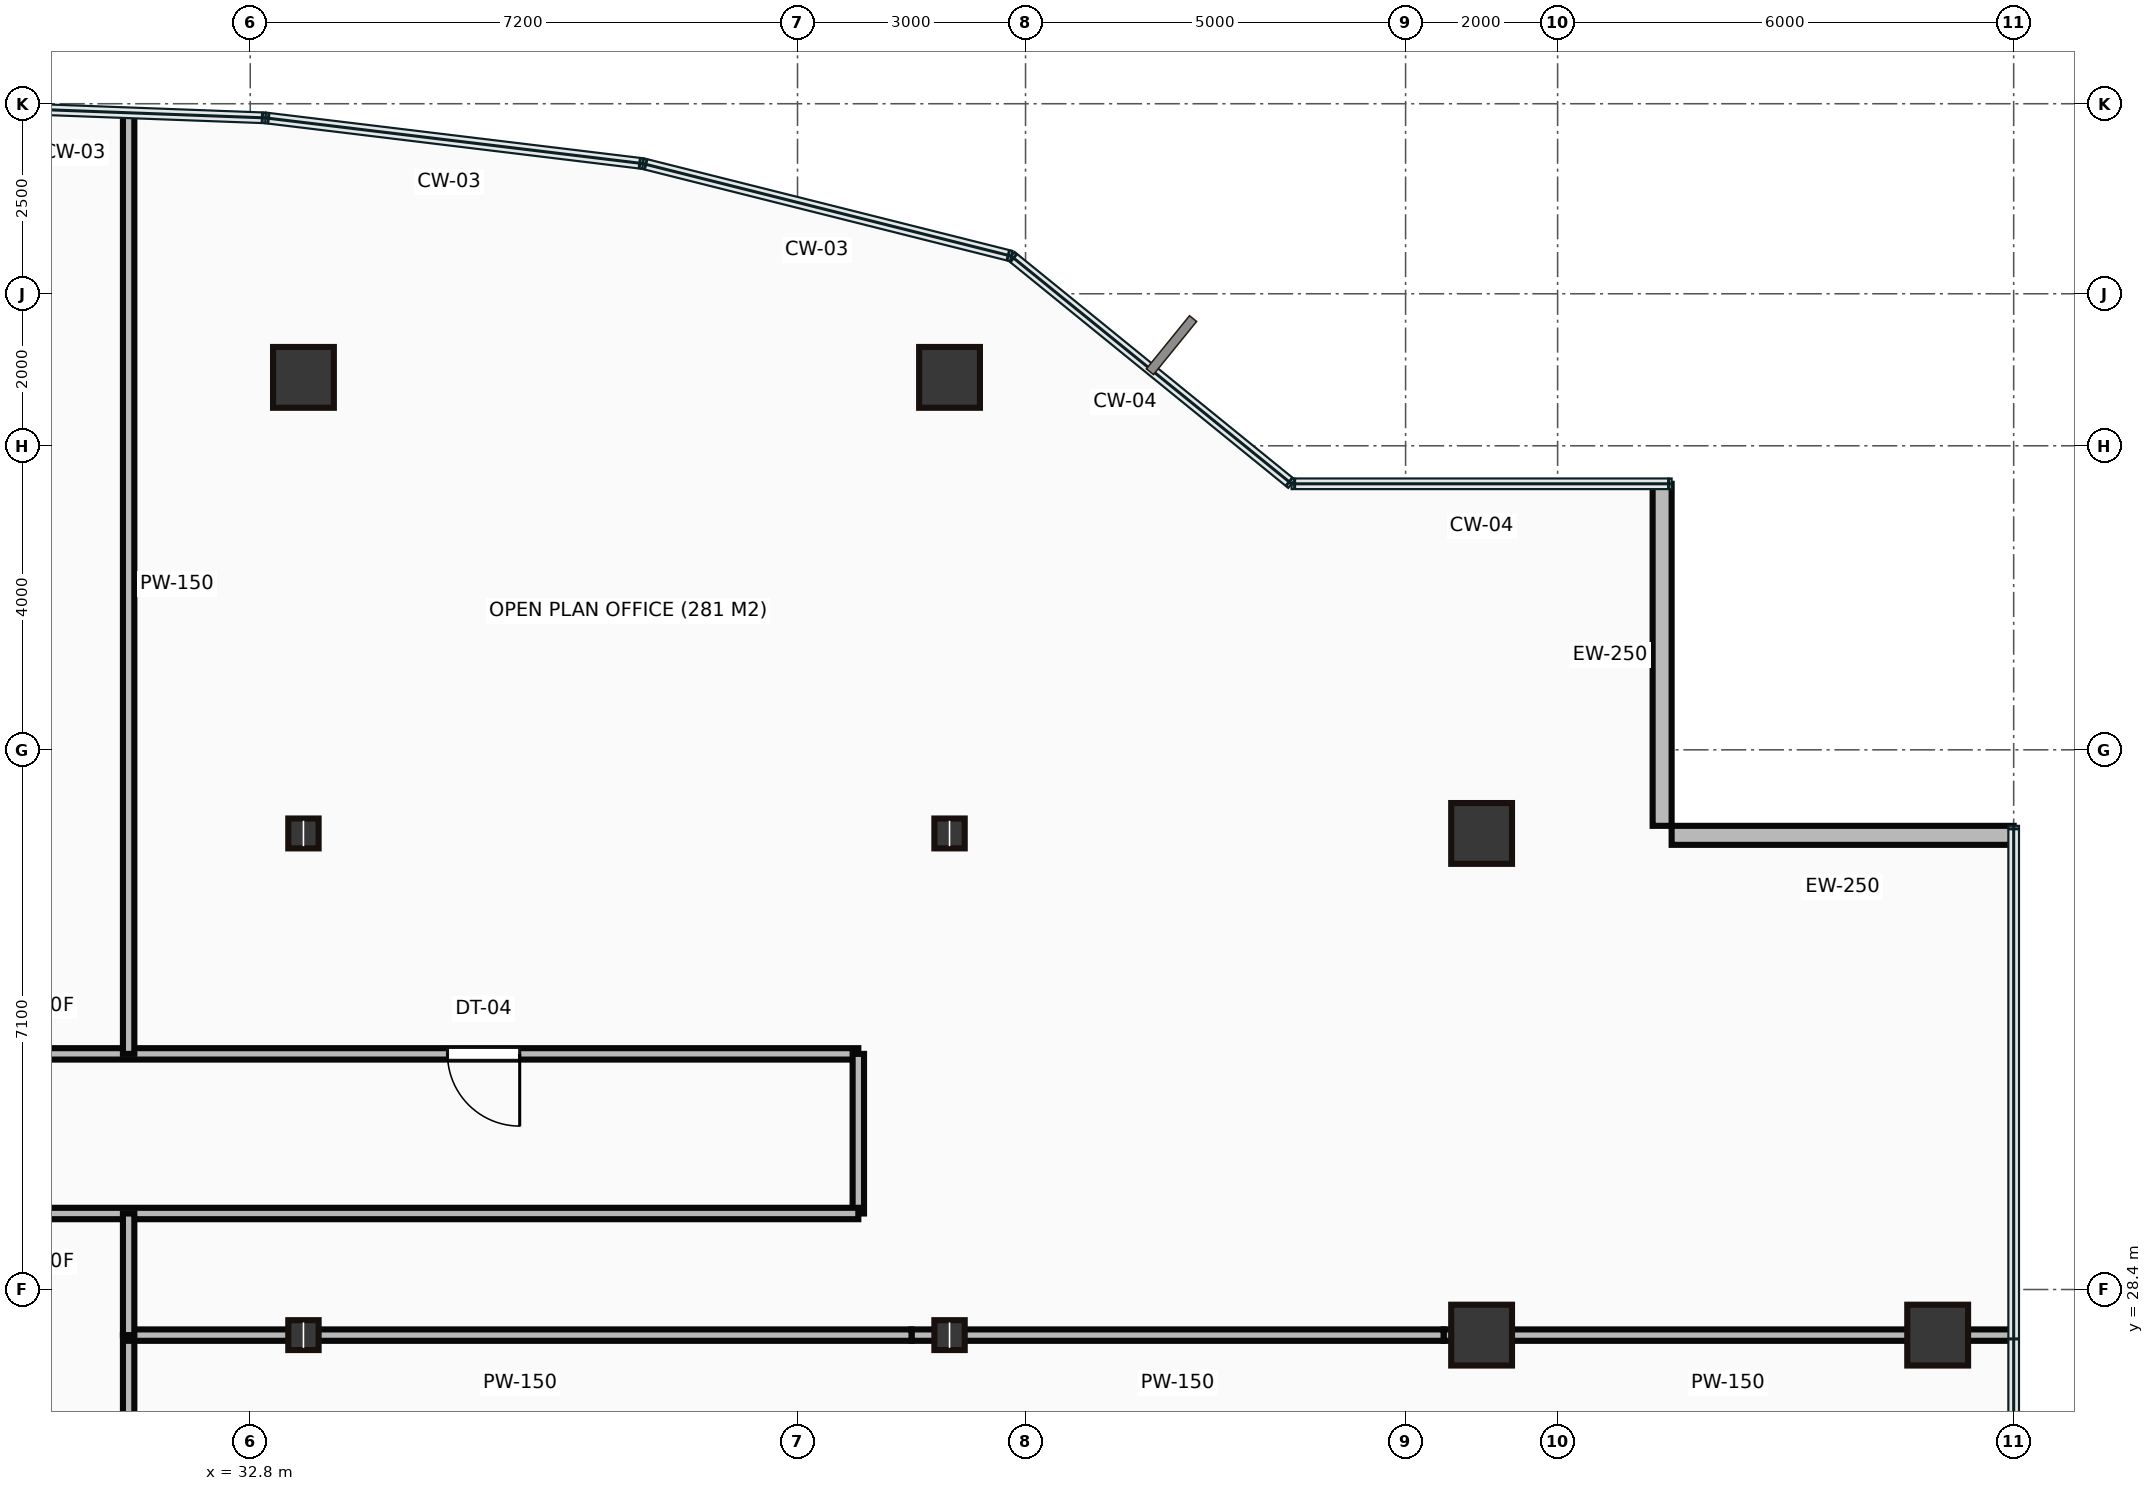
"""IFC4 building model, lengths in metres.
Left out: names, types, materials, properties, quantities, classifications, styles, units other than length and angle.
Written with IfcOpenShell. Run it as: python <this file> out.ifc"""

import sys

from ifc_helpers import new_model, si_unit, direction, frame, frame_2d, origin, origin_2d, place, context, subcontext, project, spatial, rectangle, hollow_rectangle, i_section, extrude, source, transform, mapped, element, fill, save


model = new_model("IFC4")
c1 = context("Model", 3, precision=1e-05, world=origin(), true_north=direction((0.0, 1.0)))
c2 = subcontext(c1, "Body", "Model", "MODEL_VIEW")
j1 = project(units=[si_unit("LENGTHUNIT", "METRE"), si_unit("PLANEANGLEUNIT", "RADIAN")], contexts=[c1])
p1 = place(None, origin())
s1 = spatial("IfcSite", under=j1, at=p1, CompositionType="ELEMENT")
p2 = place(p1, origin())
s2 = spatial("IfcBuilding", under=s1, at=p2, CompositionType="ELEMENT")
p3 = place(p2, frame((0.0, 0.0, 110.55)))
s3 = spatial("IfcBuildingStorey", under=s2, at=p3, CompositionType="ELEMENT", Elevation=110.55)
m1 = source(origin(), c2, "Body", "SweptSolid", [
    extrude(i_section(OverallWidth=0.399, OverallDepth=0.393, WebThickness=0.023, FlangeThickness=0.037, at=origin_2d()), origin(), (0.0, 0.0, 1.0), 3.65),
])
for number, where, z_axis, x_axis in (
    (1, (33.5, 27.8, 0.0), (0.0, 0.0, 1.0), (1.0, 0.0, 0.0)),
    (2, (33.5, 34.4, 0.0), (0.0, 0.0, 1.0), (1.0, 0.0, 0.0)),
):
    element("IfcColumn", number, at=place(p3, frame(where, z_axis=z_axis, x_axis=x_axis)), inside=s3, PredefinedType="COLUMN", context=c2, shape_type="MappedRepresentation", body=[
        mapped(m1, transform((0.0, 0.0, 0.0))),
    ])
m2 = source(origin(), c2, "Body", "SweptSolid", [
    extrude(hollow_rectangle(XDim=0.8, YDim=0.8, WallThickness=0.04, at=origin_2d()), origin(), (0.0, 0.0, 1.0), 3.65),
])
p4 = place(p3, frame((33.5, 40.4, 0.0), z_axis=(0.0, 0.0, 1.0), x_axis=(1.0, 0.0, 0.0)))
e3 = element("IfcColumn", 3, at=p4, inside=s3, PredefinedType="COLUMN", context=c2, shape_type="MappedRepresentation", body=[
    mapped(m2, transform((0.0, 0.0, 0.0))),
])
for number, where, z_axis, x_axis in (
    (4, (42.0, 27.8, 0.0), (0.0, 0.0, 1.0), (1.0, 0.0, 0.0)),
    (5, (42.0, 34.4, 0.0), (0.0, 0.0, 1.0), (1.0, 0.0, 0.0)),
):
    element("IfcColumn", number, at=place(p3, frame(where, z_axis=z_axis, x_axis=x_axis)), inside=s3, PredefinedType="COLUMN", context=c2, shape_type="MappedRepresentation", body=[
        mapped(m1, transform((0.0, 0.0, 0.0))),
    ])
for number, where, z_axis, x_axis in (
    (6, (42.0, 40.4, 0.0), (0.0, 0.0, 1.0), (1.0, 0.0, 0.0)),
    (7, (49.0, 27.8, 0.0), (0.0, 0.0, 1.0), (1.0, 0.0, 0.0)),
    (8, (49.0, 34.4, 0.0), (0.0, 0.0, 1.0), (1.0, 0.0, 0.0)),
    (9, (55.0, 27.8, 0.0), (0.0, 0.0, 1.0), (1.0, 0.0, 0.0)),
):
    element("IfcColumn", number, at=place(p3, frame(where, z_axis=z_axis, x_axis=x_axis)), inside=s3, PredefinedType="COLUMN", context=c2, shape_type="MappedRepresentation", body=[
        mapped(m2, transform((0.0, 0.0, 0.0))),
    ])
m3 = source(origin(), c2, "Body", "SweptSolid", [
    extrude(rectangle(XDim=4.5, YDim=0.25, at=frame_2d((2.25, 0.0))), origin(), (0.0, 0.0, 1.0), 3.4),
])
for number, where, z_axis, x_axis in (
    (10, (56.0, 34.375, 0.0), (0.0, 0.0, 1.0), (-1.0, 0.0, 0.0)),
    (11, (51.375, 34.5, 0.0), (0.0, 0.0, 1.0), (0.0, 1.0, 0.0)),
):
    element("IfcWall", number, at=place(p3, frame(where, z_axis=z_axis, x_axis=x_axis)), inside=s3, PredefinedType="STANDARD", context=c2, shape_type="MappedRepresentation", body=[
        mapped(m3, transform((0.0, 0.0, 0.0))),
    ])
m4 = source(origin(), c2, "Body", "SweptSolid", [
    extrude(rectangle(XDim=21.75, YDim=0.15, at=frame_2d((10.875, 0.0))), origin(), (0.0, 0.0, 1.0), 3.4),
])
p5 = place(p3, frame((19.05, 31.5, 0.0), z_axis=(0.0, 0.0, 1.0), x_axis=(1.0, 0.0, 0.0)))
e12 = element("IfcWall", 12, at=p5, inside=s3, PredefinedType="PARTITIONING", context=c2, shape_type="MappedRepresentation", body=[
    mapped(m4, transform((0.0, 0.0, 0.0))),
])
p6 = place(p5, frame((1.03, 0.0, 0.0)))
e13 = element("IfcOpeningElement", 13, at=p6, cuts=e12, PredefinedType="OPENING", context=c2, shape_type="SweptSolid", body=[
    extrude(rectangle(XDim=0.95, YDim=2.15, at=frame_2d((0.475, 1.075))), frame((0.0, 0.085, 0.0), z_axis=(0.0, -1.0, 0.0), x_axis=(1.0, 0.0, 0.0)), (0.0, 0.0, 1.0), 0.17),
])
p7 = place(p5, frame((6.975, 0.0, 0.0)))
e14 = element("IfcOpeningElement", 14, at=p7, cuts=e12, PredefinedType="OPENING", context=c2, shape_type="SweptSolid", body=[
    extrude(rectangle(XDim=0.95, YDim=2.15, at=frame_2d((0.475, 1.075))), frame((0.0, 0.085, 0.0), z_axis=(0.0, -1.0, 0.0), x_axis=(1.0, 0.0, 0.0)), (0.0, 0.0, 1.0), 0.17),
])
p8 = place(p5, frame((16.345, 0.0, 0.0)))
e15 = element("IfcOpeningElement", 15, at=p8, cuts=e12, PredefinedType="OPENING", context=c2, shape_type="SweptSolid", body=[
    extrude(rectangle(XDim=0.95, YDim=2.15, at=frame_2d((0.475, 1.075))), frame((0.0, 0.085, 0.0), z_axis=(0.0, -1.0, 0.0), x_axis=(1.0, 0.0, 0.0)), (0.0, 0.0, 1.0), 0.17),
])
m5 = source(origin(), c2, "Body", "SweptSolid", [
    extrude(rectangle(XDim=2.1, YDim=0.15, at=frame_2d((1.05, 0.0))), origin(), (0.0, 0.0, 1.0), 3.4),
])
p9 = place(p3, frame((40.8, 31.5, 0.0), z_axis=(0.0, 0.0, 1.0), x_axis=(0.0, -1.0, 0.0)))
e16 = element("IfcWall", 16, at=p9, inside=s3, PredefinedType="PARTITIONING", context=c2, shape_type="MappedRepresentation", body=[
    mapped(m5, transform((0.0, 0.0, 0.0))),
])
p10 = place(p3, frame((40.8, 29.4, 0.0), z_axis=(0.0, 0.0, 1.0), x_axis=(-1.0, 0.0, 0.0)))
e17 = element("IfcWall", 17, at=p10, inside=s3, PredefinedType="PARTITIONING", context=c2, shape_type="MappedRepresentation", body=[
    mapped(m4, transform((0.0, 0.0, 0.0))),
])
m6 = source(origin(), c2, "Body", "SweptSolid", [
    extrude(rectangle(XDim=11.5, YDim=0.15, at=frame_2d((5.75, 0.0))), origin(), (0.0, 0.0, 1.0), 3.4),
])
p11 = place(p3, frame((31.2, 27.8, 0.0), z_axis=(0.0, 0.0, 1.0), x_axis=(0.0, -1.0, 0.0)))
e18 = element("IfcWall", 18, at=p11, inside=s3, PredefinedType="PARTITIONING", context=c2, shape_type="MappedRepresentation", body=[
    mapped(m6, transform((0.0, 0.0, 0.0))),
])
m7 = source(origin(), c2, "Body", "SweptSolid", [
    extrude(rectangle(XDim=7.48, YDim=0.15, at=frame_2d((3.74, 0.0))), origin(), (0.0, 0.0, 1.0), 2.702),
])
p12 = place(p3, frame((55.98, 27.8, 0.0), z_axis=(0.0, 0.0, 1.0), x_axis=(-1.0, 0.0, 0.0)))
e19 = element("IfcWall", 19, at=p12, inside=s3, PredefinedType="PARTITIONING", context=c2, shape_type="MappedRepresentation", body=[
    mapped(m7, transform((0.0, 0.0, 0.0))),
])
m8 = source(origin(), c2, "Body", "SweptSolid", [
    extrude(rectangle(XDim=7.0, YDim=0.15, at=frame_2d((3.5, 0.0))), origin(), (0.0, 0.0, 1.0), 2.702),
])
p13 = place(p3, frame((48.5, 27.8, 0.0), z_axis=(0.0, 0.0, 1.0), x_axis=(-1.0, 0.0, 0.0)))
e20 = element("IfcWall", 20, at=p13, inside=s3, PredefinedType="PARTITIONING", context=c2, shape_type="MappedRepresentation", body=[
    mapped(m8, transform((0.0, 0.0, 0.0))),
])
m9 = source(origin(), c2, "Body", "SweptSolid", [
    extrude(rectangle(XDim=10.3, YDim=0.15, at=frame_2d((5.15, 0.0))), origin(), (0.0, 0.0, 1.0), 2.702),
])
p14 = place(p3, frame((41.5, 27.8, 0.0), z_axis=(0.0, 0.0, 1.0), x_axis=(-1.0, 0.0, 0.0)))
e21 = element("IfcWall", 21, at=p14, inside=s3, PredefinedType="PARTITIONING", context=c2, shape_type="MappedRepresentation", body=[
    mapped(m9, transform((0.0, 0.0, 0.0))),
])
m10 = source(origin(), c2, "Body", "SweptSolid", [
    extrude(rectangle(XDim=1.6, YDim=0.15, at=frame_2d((0.8, 0.0))), origin(), (0.0, 0.0, 1.0), 3.4),
])
p15 = place(p3, frame((31.2, 29.4, 0.0), z_axis=(0.0, 0.0, 1.0), x_axis=(0.0, -1.0, 0.0)))
e22 = element("IfcWall", 22, at=p15, inside=s3, PredefinedType="PARTITIONING", context=c2, shape_type="MappedRepresentation", body=[
    mapped(m10, transform((0.0, 0.0, 0.0))),
])
m11 = source(origin(), c2, "Body", "SweptSolid", [
    extrude(rectangle(XDim=12.361, YDim=0.15, at=frame_2d((6.18, 0.0))), origin(), (0.0, 0.0, 1.0), 3.4),
])
p16 = place(p3, frame((31.2, 43.861, 0.0), z_axis=(0.0, 0.0, 1.0), x_axis=(0.0, -1.0, 0.0)))
e23 = element("IfcWall", 23, at=p16, inside=s3, PredefinedType="PARTITIONING", context=c2, shape_type="MappedRepresentation", body=[
    mapped(m11, transform((0.0, 0.0, 0.0))),
])
m12 = source(origin(), c2, "Body", "SweptSolid", [
    extrude(rectangle(XDim=0.95, YDim=2.15, at=frame_2d((0.475, 1.075))), frame((0.0, 0.025, 0.0), z_axis=(0.0, -1.0, 0.0), x_axis=(1.0, 0.0, 0.0)), (0.0, 0.0, 1.0), 0.05),
])
p17 = place(p8, origin())
e24 = element("IfcDoor", 24, at=p17, inside=s3, OperationType="SINGLE_SWING_RIGHT", PredefinedType="DOOR", context=c2, shape_type="MappedRepresentation", body=[
    mapped(m12, transform((0.0, 0.0, 0.0))),
])
fill(e15, e24)
save(model, sys.argv[1])
